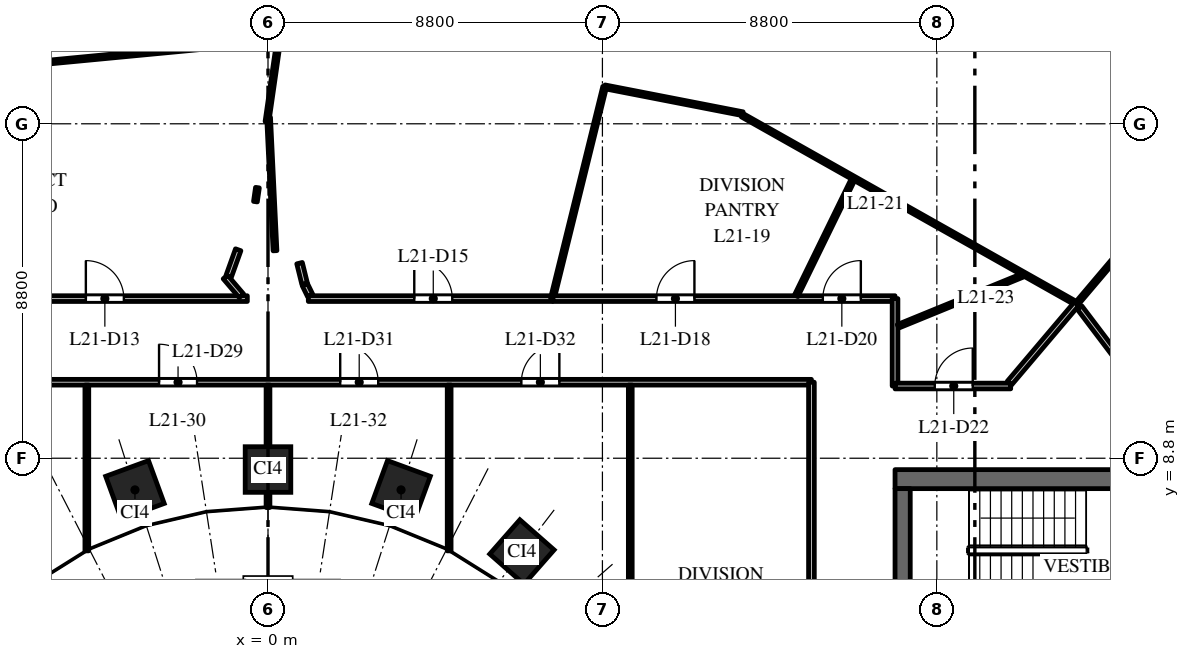
"""IFC4 building model, lengths in metres.
Left out: names, types, materials, properties, quantities, classifications, styles, units other than length and angle.
Written with IfcOpenShell. Run it as: python <this file> out.ifc"""

import sys

from ifc_helpers import new_model, si_unit, direction, frame, frame_2d, origin, origin_2d, place, context, subcontext, project, spatial, rectangle, extrude, element, fill, save


model = new_model("IFC4")
c1 = context("Model", 3, precision=1e-05, world=origin(), true_north=direction((0.0, 1.0)))
c2 = subcontext(c1, "Body", "Model", "MODEL_VIEW")
j1 = project(units=[si_unit("LENGTHUNIT", "METRE"), si_unit("PLANEANGLEUNIT", "RADIAN")], contexts=[c1])
p1 = place(None, origin())
s1 = spatial("IfcSite", under=j1, at=p1, CompositionType="ELEMENT")
p2 = place(p1, origin())
s2 = spatial("IfcBuilding", under=s1, at=p2, CompositionType="ELEMENT")
p3 = place(p2, frame((0.0, 0.0, 96.0)))
s3 = spatial("IfcBuildingStorey", under=s2, at=p3, CompositionType="ELEMENT", Elevation=96.0)
for number, where, z_axis, x_axis in (
    (1, (6.682, 6.334, 0.0), (0.0, 0.0, 1.0), (-0.751, 0.66, 0.0)),
    (2, (3.501, 7.967, 0.0), (0.0, 0.0, 1.0), (-0.939, 0.344, 0.0)),
    (3, (0.0, 8.503, 0.0), (0.0, 0.0, 1.0), (-1.0, 0.0, 0.0)),
    (4, (-3.501, 7.967, 0.0), (0.0, 0.0, 1.0), (-0.939, -0.344, 0.0)),
):
    element("IfcColumn", number, at=place(p3, frame(where, z_axis=z_axis, x_axis=x_axis)), inside=s3, PredefinedType="COLUMN", context=c2, shape_type="SweptSolid", body=[
        extrude(rectangle(XDim=1.2, YDim=1.2, at=origin_2d()), origin(), (0.0, 0.0, 1.0), 4.0),
    ])
p4 = place(p3, frame((16.5, 8.25, 0.0), z_axis=(0.0, 0.0, 1.0), x_axis=(1.0, 0.0, 0.0)))
e5 = element("IfcWall", 5, at=p4, inside=s3, PredefinedType="SHEAR", context=c2, shape_type="SweptSolid", body=[
    extrude(rectangle(XDim=15.0, YDim=0.5, at=frame_2d((7.5, 0.0))), origin(), (0.0, 0.0, 1.0), 3.7),
])
p5 = place(p4, frame((6.9, 0.0, 0.0)))
e6 = element("IfcOpeningElement", 6, at=p5, cuts=e5, PredefinedType="OPENING", context=c2, shape_type="SweptSolid", body=[
    extrude(rectangle(XDim=1.2, YDim=2.1, at=frame_2d((0.6, 1.05))), frame((0.0, 0.26, 0.0), z_axis=(0.0, -1.0, 0.0), x_axis=(1.0, 0.0, 0.0)), (0.0, 0.0, 1.0), 0.52),
])
p6 = place(p4, frame((12.05, 0.0, 0.0)))
e7 = element("IfcOpeningElement", 7, at=p6, cuts=e5, PredefinedType="OPENING", context=c2, shape_type="SweptSolid", body=[
    extrude(rectangle(XDim=0.9, YDim=2.1, at=frame_2d((0.45, 1.05))), frame((0.0, 0.26, 0.0), z_axis=(0.0, -1.0, 0.0), x_axis=(1.0, 0.0, 0.0)), (0.0, 0.0, 1.0), 0.52),
])
p7 = place(p3, frame((16.7, -8.0, 0.0), z_axis=(0.0, 0.0, 1.0), x_axis=(0.0, 1.0, 0.0)))
e8 = element("IfcWall", 8, at=p7, inside=s3, PredefinedType="SHEAR", context=c2, shape_type="SweptSolid", body=[
    extrude(rectangle(XDim=16.0, YDim=0.4, at=frame_2d((8.0, 0.0))), origin(), (0.0, 0.0, 1.0), 3.7),
])
p8 = place(p3, frame((-14.3, 10.8, 0.0), z_axis=(0.0, 0.0, 1.0), x_axis=(1.0, 0.0, 0.0)))
e9 = element("IfcWall", 9, at=p8, inside=s3, PredefinedType="PARTITIONING", context=c2, shape_type="SweptSolid", body=[
    extrude(rectangle(XDim=28.6, YDim=0.15, at=frame_2d((14.3, 0.0))), origin(), (0.0, 0.0, 1.0), 2.85),
])
p9 = place(p8, frame((11.433, 0.0, 0.0)))
e10 = element("IfcOpeningElement", 10, at=p9, cuts=e9, PredefinedType="OPENING", context=c2, shape_type="SweptSolid", body=[
    extrude(rectangle(XDim=1.0, YDim=2.1, at=frame_2d((0.5, 1.05))), frame((0.0, 0.085, 0.0), z_axis=(0.0, -1.0, 0.0), x_axis=(1.0, 0.0, 0.0)), (0.0, 0.0, 1.0), 0.17),
])
p10 = place(p8, frame((16.2, 0.0, 0.0)))
e11 = element("IfcOpeningElement", 11, at=p10, cuts=e9, PredefinedType="OPENING", context=c2, shape_type="SweptSolid", body=[
    extrude(rectangle(XDim=1.0, YDim=2.1, at=frame_2d((0.5, 1.05))), frame((0.0, 0.085, 0.0), z_axis=(0.0, -1.0, 0.0), x_axis=(1.0, 0.0, 0.0)), (0.0, 0.0, 1.0), 0.17),
])
p11 = place(p8, frame((20.967, 0.0, 0.0)))
e12 = element("IfcOpeningElement", 12, at=p11, cuts=e9, PredefinedType="OPENING", context=c2, shape_type="SweptSolid", body=[
    extrude(rectangle(XDim=1.0, YDim=2.1, at=frame_2d((0.5, 1.05))), frame((0.0, 0.085, 0.0), z_axis=(0.0, -1.0, 0.0), x_axis=(1.0, 0.0, 0.0)), (0.0, 0.0, 1.0), 0.17),
])
p12 = place(p3, frame((-8.802, 18.935, 0.0), z_axis=(0.0, 0.0, 1.0), x_axis=(0.995486812939, 0.094899975054, 0.0)))
e13 = element("IfcWall", 13, at=p12, inside=s3, PredefinedType="PARTITIONING", context=c2, shape_type="SweptSolid", body=[
    extrude(rectangle(XDim=8.24, YDim=0.1, at=frame_2d((4.12, 0.0))), origin(), (0.0, 0.0, 1.0), 2.85),
])
p13 = place(p3, frame((-7.767, 13.0, 0.0), z_axis=(0.0, 0.0, 1.0), x_axis=(1.0, 0.0, 0.0)))
e14 = element("IfcWall", 14, at=p13, inside=s3, PredefinedType="PARTITIONING", context=c2, shape_type="SweptSolid", body=[
    extrude(rectangle(XDim=7.223, YDim=0.15, at=frame_2d((3.612, 0.0))), origin(), (0.0, 0.0, 1.0), 2.85),
])
p14 = place(p13, frame((2.974, 0.0, 0.0)))
e15 = element("IfcOpeningElement", 15, at=p14, cuts=e14, PredefinedType="OPENING", context=c2, shape_type="SweptSolid", body=[
    extrude(rectangle(XDim=1.0, YDim=2.1, at=frame_2d((0.5, 1.05))), frame((0.0, 0.085, 0.0), z_axis=(0.0, -1.0, 0.0), x_axis=(1.0, 0.0, 0.0)), (0.0, 0.0, 1.0), 0.17),
])
p15 = place(p3, frame((-4.767, 6.363, 0.0), z_axis=(0.0, 0.0, 1.0), x_axis=(0.0, 1.0, 0.0)))
e16 = element("IfcWall", 16, at=p15, inside=s3, PredefinedType="PARTITIONING", context=c2, shape_type="SweptSolid", body=[
    extrude(rectangle(XDim=4.362, YDim=0.1, at=frame_2d((2.181, 0.0))), origin(), (0.0, 0.0, 1.0), 2.9),
])
p16 = place(p3, frame((-1.122, 13.57, 0.0), z_axis=(0.0, 0.0, 1.0), x_axis=(0.648780487805, -0.760975609756, 0.0)))
e17 = element("IfcWall", 17, at=p16, inside=s3, PredefinedType="PARTITIONING", context=c2, shape_type="SweptSolid", body=[
    extrude(rectangle(XDim=0.651, YDim=0.15, at=frame_2d((0.325, 0.0))), origin(), (0.0, 0.0, 1.0), 2.85),
])
p17 = place(p3, frame((-1.035, 13.586, 0.0), z_axis=(0.0, 0.0, 1.0), x_axis=(0.337939421495, 0.941167863561, 0.0)))
e18 = element("IfcWall", 18, at=p17, inside=s3, PredefinedType="PARTITIONING", context=c2, shape_type="SweptSolid", body=[
    extrude(rectangle(XDim=0.743, YDim=0.15, at=frame_2d((0.371, 0.0))), origin(), (0.0, 0.0, 1.0), 2.85),
])
p18 = place(p3, frame((-0.331, 15.551, 0.0), z_axis=(0.0, 0.0, 1.0), x_axis=(0.142155020728, 0.989844407006, 0.0)))
e19 = element("IfcWall", 19, at=p18, inside=s3, PredefinedType="PARTITIONING", context=c2, shape_type="SweptSolid", body=[
    extrude(rectangle(XDim=0.373, YDim=0.1, at=frame_2d((0.187, 0.0))), origin(), (0.0, 0.0, 1.0), 3.7),
])
p19 = place(p3, frame((-0.027, 17.654, 0.0), z_axis=(0.0, 0.0, 1.0), x_axis=(0.142950746257, 0.989729803605, 0.0)))
e20 = element("IfcWall", 20, at=p19, inside=s3, PredefinedType="PARTITIONING", context=c2, shape_type="SweptSolid", body=[
    extrude(rectangle(XDim=10.346, YDim=0.1, at=frame_2d((5.173, 0.0))), origin(), (0.0, 0.0, 1.0), 2.9),
])
p20 = place(p3, frame((0.0, 7.504, 0.0), z_axis=(0.0, 0.0, 1.0), x_axis=(0.0, 1.0, 0.0)))
e21 = element("IfcWall", 21, at=p20, inside=s3, PredefinedType="PARTITIONING", context=c2, shape_type="SweptSolid", body=[
    extrude(rectangle(XDim=3.221, YDim=0.1, at=frame_2d((1.611, 0.0))), origin(), (0.0, 0.0, 1.0), 3.7),
])
p21 = place(p3, frame((0.016, 17.767, 0.0), z_axis=(0.0, 0.0, 1.0), x_axis=(0.047839350467, -0.99885504281, 0.0)))
e22 = element("IfcWall", 22, at=p21, inside=s3, PredefinedType="PARTITIONING", context=c2, shape_type="SweptSolid", body=[
    extrude(rectangle(XDim=3.511, YDim=0.1, at=frame_2d((1.755, 0.0))), origin(), (0.0, 0.0, 1.0), 3.7),
])
p22 = place(p3, frame((0.83, 13.933, 0.0), z_axis=(0.0, 0.0, 1.0), x_axis=(0.239578315167, -0.970877042113, 0.0)))
e23 = element("IfcWall", 23, at=p22, inside=s3, PredefinedType="PARTITIONING", context=c2, shape_type="SweptSolid", body=[
    extrude(rectangle(XDim=0.563, YDim=0.15, at=frame_2d((0.282, 0.0))), origin(), (0.0, 0.0, 1.0), 3.7),
])
p23 = place(p3, frame((0.969, 13.369, 0.0), z_axis=(0.0, 0.0, 1.0), x_axis=(0.440240923942, -0.897879685084, 0.0)))
e24 = element("IfcWall", 24, at=p23, inside=s3, PredefinedType="PARTITIONING", context=c2, shape_type="SweptSolid", body=[
    extrude(rectangle(XDim=0.323, YDim=0.15, at=frame_2d((0.161, 0.0))), origin(), (0.0, 0.0, 1.0), 3.7),
])
p24 = place(p3, frame((1.061, 13.0, 0.0), z_axis=(0.0, 0.0, 1.0), x_axis=(1.0, 0.0, 0.0)))
e25 = element("IfcWall", 25, at=p24, inside=s3, PredefinedType="PARTITIONING", context=c2, shape_type="SweptSolid", body=[
    extrude(rectangle(XDim=6.422, YDim=0.15, at=frame_2d((3.211, 0.0))), origin(), (0.0, 0.0, 1.0), 2.85),
])
p25 = place(p24, frame((2.788, 0.0, 0.0)))
e26 = element("IfcOpeningElement", 26, at=p25, cuts=e25, PredefinedType="OPENING", context=c2, shape_type="SweptSolid", body=[
    extrude(rectangle(XDim=1.0, YDim=2.1, at=frame_2d((0.5, 1.05))), frame((0.0, 0.085, 0.0), z_axis=(0.0, -1.0, 0.0), x_axis=(1.0, 0.0, 0.0)), (0.0, 0.0, 1.0), 0.17),
])
p26 = place(p3, frame((4.767, 6.363, 0.0), z_axis=(0.0, 0.0, 1.0), x_axis=(0.0, 1.0, 0.0)))
e27 = element("IfcWall", 27, at=p26, inside=s3, PredefinedType="PARTITIONING", context=c2, shape_type="SweptSolid", body=[
    extrude(rectangle(XDim=4.362, YDim=0.1, at=frame_2d((2.181, 0.0))), origin(), (0.0, 0.0, 1.0), 2.85),
])
p27 = place(p3, frame((7.483, 13.0, 0.0), z_axis=(0.0, 0.0, 1.0), x_axis=(0.239702552944, 0.970846376165, 0.0)))
e28 = element("IfcWall", 28, at=p27, inside=s3, PredefinedType="PARTITIONING", context=c2, shape_type="SweptSolid", body=[
    extrude(rectangle(XDim=5.74, YDim=0.1, at=frame_2d((2.87, 0.0))), origin(), (0.0, 0.0, 1.0), 3.7),
])
p28 = place(p3, frame((7.499, 13.0, 0.0), z_axis=(0.0, 0.0, 1.0), x_axis=(1.0, 0.0, 0.0)))
e29 = element("IfcWall", 29, at=p28, inside=s3, PredefinedType="PARTITIONING", context=c2, shape_type="SweptSolid", body=[
    extrude(rectangle(XDim=9.001, YDim=0.15, at=frame_2d((4.5, 0.0))), origin(), (0.0, 0.0, 1.0), 2.85),
])
p29 = place(p28, frame((2.722, 0.0, 0.0)))
e30 = element("IfcOpeningElement", 30, at=p29, cuts=e29, PredefinedType="OPENING", context=c2, shape_type="SweptSolid", body=[
    extrude(rectangle(XDim=1.0, YDim=2.1, at=frame_2d((0.5, 1.05))), frame((0.0, 0.085, 0.0), z_axis=(0.0, -1.0, 0.0), x_axis=(1.0, 0.0, 0.0)), (0.0, 0.0, 1.0), 0.17),
])
p30 = place(p28, frame((7.101, 0.0, 0.0)))
e31 = element("IfcOpeningElement", 31, at=p30, cuts=e29, PredefinedType="OPENING", context=c2, shape_type="SweptSolid", body=[
    extrude(rectangle(XDim=1.0, YDim=2.1, at=frame_2d((0.5, 1.05))), frame((0.0, 0.085, 0.0), z_axis=(0.0, -1.0, 0.0), x_axis=(1.0, 0.0, 0.0)), (0.0, 0.0, 1.0), 0.17),
])
p31 = place(p3, frame((8.859, 18.573, 0.0), z_axis=(0.0, 0.0, 1.0), x_axis=(0.981554610727, -0.191181971328, 0.0)))
e32 = element("IfcWall", 32, at=p31, inside=s3, PredefinedType="PARTITIONING", context=c2, shape_type="SweptSolid", body=[
    extrude(rectangle(XDim=3.703, YDim=0.1, at=frame_2d((1.852, 0.0))), origin(), (0.0, 0.0, 1.0), 2.85),
])
p32 = place(p3, frame((9.533, -10.725, 0.0), z_axis=(0.0, 0.0, 1.0), x_axis=(0.0, 1.0, 0.0)))
e33 = element("IfcWall", 33, at=p32, inside=s3, PredefinedType="PARTITIONING", context=c2, shape_type="SweptSolid", body=[
    extrude(rectangle(XDim=21.45, YDim=0.1, at=frame_2d((10.725, 0.0))), origin(), (0.0, 0.0, 1.0), 2.75),
])
p33 = place(p3, frame((12.48, 17.825, 0.0), z_axis=(0.0, 0.0, 1.0), x_axis=(0.871131718637, -0.491049415827, 0.0)))
e34 = element("IfcWall", 34, at=p33, inside=s3, PredefinedType="PARTITIONING", context=c2, shape_type="SweptSolid", body=[
    extrude(rectangle(XDim=10.101, YDim=0.1, at=frame_2d((5.05, 0.0))), origin(), (0.0, 0.0, 1.0), 3.7),
])
p34 = place(p3, frame((13.899, 13.075, 0.0), z_axis=(0.0, 0.0, 1.0), x_axis=(0.439170148288, 0.898403907412, 0.0)))
e35 = element("IfcWall", 35, at=p34, inside=s3, PredefinedType="PARTITIONING", context=c2, shape_type="SweptSolid", body=[
    extrude(rectangle(XDim=3.395, YDim=0.1, at=frame_2d((1.698, 0.0))), origin(), (0.0, 0.0, 1.0), 3.7),
])
p35 = place(p3, frame((14.3, -10.8, 0.0), z_axis=(0.0, 0.0, 1.0), x_axis=(0.0, 1.0, 0.0)))
e36 = element("IfcWall", 36, at=p35, inside=s3, PredefinedType="PARTITIONING", context=c2, shape_type="SweptSolid", body=[
    extrude(rectangle(XDim=21.6, YDim=0.15, at=frame_2d((10.8, 0.0))), origin(), (0.0, 0.0, 1.0), 2.75),
])
p36 = place(p35, frame((10.2, 0.0, 0.0)))
e37 = element("IfcOpeningElement", 37, at=p36, cuts=e36, PredefinedType="OPENING", context=c2, shape_type="SweptSolid", body=[
    extrude(rectangle(XDim=1.0, YDim=2.1, at=frame_2d((0.5, 1.05))), frame((0.0, 0.085, 0.0), z_axis=(0.0, -1.0, 0.0), x_axis=(1.0, 0.0, 0.0)), (0.0, 0.0, 1.0), 0.17),
])
p37 = place(p3, frame((16.5, 10.7, 0.0), z_axis=(0.0, 0.0, 1.0), x_axis=(0.0, 1.0, 0.0)))
e38 = element("IfcWall", 38, at=p37, inside=s3, PredefinedType="PARTITIONING", context=c2, shape_type="SweptSolid", body=[
    extrude(rectangle(XDim=2.3, YDim=0.15, at=frame_2d((1.15, 0.0))), origin(), (0.0, 0.0, 1.0), 3.7),
])
p38 = place(p3, frame((16.5, 10.7, 0.0), z_axis=(0.0, 0.0, 1.0), x_axis=(1.0, 0.0, 0.0)))
e39 = element("IfcWall", 39, at=p38, inside=s3, PredefinedType="PARTITIONING", context=c2, shape_type="SweptSolid", body=[
    extrude(rectangle(XDim=3.043, YDim=0.15, at=frame_2d((1.521, 0.0))), origin(), (0.0, 0.0, 1.0), 3.7),
])
p39 = place(p38, frame((1.045, 0.0, 0.0)))
e40 = element("IfcOpeningElement", 40, at=p39, cuts=e39, PredefinedType="OPENING", context=c2, shape_type="SweptSolid", body=[
    extrude(rectangle(XDim=1.0, YDim=2.1, at=frame_2d((0.5, 1.05))), frame((0.0, 0.085, 0.0), z_axis=(0.0, -1.0, 0.0), x_axis=(1.0, 0.0, 0.0)), (0.0, 0.0, 1.0), 0.17),
])
p40 = place(p3, frame((16.579, 12.271, 0.0), z_axis=(0.0, 0.0, 1.0), x_axis=(0.925511782592, 0.378718814272, 0.0)))
e41 = element("IfcWall", 41, at=p40, inside=s3, PredefinedType="PARTITIONING", context=c2, shape_type="SweptSolid", body=[
    extrude(rectangle(XDim=3.539, YDim=0.1, at=frame_2d((1.769, 0.0))), origin(), (0.0, 0.0, 1.0), 3.7),
])
p41 = place(p3, frame((19.511, 10.778, 0.0), z_axis=(0.0, 0.0, 1.0), x_axis=(0.64641426768, 0.762986628021, 0.0)))
e42 = element("IfcWall", 42, at=p41, inside=s3, PredefinedType="PARTITIONING", context=c2, shape_type="SweptSolid", body=[
    extrude(rectangle(XDim=2.735, YDim=0.15, at=frame_2d((1.368, 0.0))), origin(), (0.0, 0.0, 1.0), 3.7),
])
p42 = place(p3, frame((21.355, 12.765, 0.0), z_axis=(0.0, 0.0, 1.0), x_axis=(0.603391001626, -0.797445483502, 0.0)))
e43 = element("IfcWall", 43, at=p42, inside=s3, PredefinedType="PARTITIONING", context=c2, shape_type="SweptSolid", body=[
    extrude(rectangle(XDim=2.68, YDim=0.15, at=frame_2d((1.34, 0.0))), origin(), (0.0, 0.0, 1.0), 2.75),
])
p43 = place(p3, frame((21.279, 12.865, 0.0), z_axis=(0.0, 0.0, 1.0), x_axis=(0.646395355102, 0.763002650652, 0.0)))
e44 = element("IfcWall", 44, at=p43, inside=s3, PredefinedType="PARTITIONING", context=c2, shape_type="SweptSolid", body=[
    extrude(rectangle(XDim=7.969, YDim=0.1, at=frame_2d((3.984, 0.0))), origin(), (0.0, 0.0, 1.0), 2.9),
])
p44 = place(p14, origin())
e45 = element("IfcDoor", 45, at=p44, inside=s3, OperationType="SINGLE_SWING_LEFT", PredefinedType="DOOR", context=c2, shape_type="SweptSolid", body=[
    extrude(rectangle(XDim=1.0, YDim=2.1, at=frame_2d((0.5, 1.05))), frame((0.0, 0.025, 0.0), z_axis=(0.0, -1.0, 0.0), x_axis=(1.0, 0.0, 0.0)), (0.0, 0.0, 1.0), 0.05),
])
fill(e15, e45)
p45 = place(p25, origin())
e46 = element("IfcDoor", 46, at=p45, inside=s3, OperationType="SINGLE_SWING_LEFT", PredefinedType="DOOR", context=c2, shape_type="SweptSolid", body=[
    extrude(rectangle(XDim=1.0, YDim=2.1, at=frame_2d((0.5, 1.05))), frame((0.0, 0.025, 0.0), z_axis=(0.0, -1.0, 0.0), x_axis=(1.0, 0.0, 0.0)), (0.0, 0.0, 1.0), 0.05),
])
fill(e26, e46)
p46 = place(p29, origin())
e47 = element("IfcDoor", 47, at=p46, inside=s3, OperationType="SINGLE_SWING_RIGHT", PredefinedType="DOOR", context=c2, shape_type="SweptSolid", body=[
    extrude(rectangle(XDim=1.0, YDim=2.1, at=frame_2d((0.5, 1.05))), frame((0.0, 0.025, 0.0), z_axis=(0.0, -1.0, 0.0), x_axis=(1.0, 0.0, 0.0)), (0.0, 0.0, 1.0), 0.05),
])
fill(e30, e47)
p47 = place(p30, origin())
e48 = element("IfcDoor", 48, at=p47, inside=s3, OperationType="SINGLE_SWING_RIGHT", PredefinedType="DOOR", context=c2, shape_type="SweptSolid", body=[
    extrude(rectangle(XDim=1.0, YDim=2.1, at=frame_2d((0.5, 1.05))), frame((0.0, 0.025, 0.0), z_axis=(0.0, -1.0, 0.0), x_axis=(1.0, 0.0, 0.0)), (0.0, 0.0, 1.0), 0.05),
])
fill(e31, e48)
p48 = place(p39, origin())
e49 = element("IfcDoor", 49, at=p48, inside=s3, OperationType="SINGLE_SWING_RIGHT", PredefinedType="DOOR", context=c2, shape_type="SweptSolid", body=[
    extrude(rectangle(XDim=1.0, YDim=2.1, at=frame_2d((0.5, 1.05))), frame((0.0, 0.025, 0.0), z_axis=(0.0, -1.0, 0.0), x_axis=(1.0, 0.0, 0.0)), (0.0, 0.0, 1.0), 0.05),
])
fill(e40, e49)
p49 = place(p9, origin())
e50 = element("IfcDoor", 50, at=p49, inside=s3, OperationType="SINGLE_SWING_LEFT", PredefinedType="DOOR", context=c2, shape_type="SweptSolid", body=[
    extrude(rectangle(XDim=1.0, YDim=2.1, at=frame_2d((0.5, 1.05))), frame((0.0, 0.025, 0.0), z_axis=(0.0, -1.0, 0.0), x_axis=(1.0, 0.0, 0.0)), (0.0, 0.0, 1.0), 0.05),
])
fill(e10, e50)
p50 = place(p10, origin())
e51 = element("IfcDoor", 51, at=p50, inside=s3, OperationType="SINGLE_SWING_LEFT", PredefinedType="DOOR", context=c2, shape_type="SweptSolid", body=[
    extrude(rectangle(XDim=1.0, YDim=2.1, at=frame_2d((0.5, 1.05))), frame((0.0, 0.025, 0.0), z_axis=(0.0, -1.0, 0.0), x_axis=(1.0, 0.0, 0.0)), (0.0, 0.0, 1.0), 0.05),
])
fill(e11, e51)
p51 = place(p11, origin())
e52 = element("IfcDoor", 52, at=p51, inside=s3, OperationType="SINGLE_SWING_RIGHT", PredefinedType="DOOR", context=c2, shape_type="SweptSolid", body=[
    extrude(rectangle(XDim=1.0, YDim=2.1, at=frame_2d((0.5, 1.05))), frame((0.0, 0.025, 0.0), z_axis=(0.0, -1.0, 0.0), x_axis=(1.0, 0.0, 0.0)), (0.0, 0.0, 1.0), 0.05),
])
fill(e12, e52)
save(model, sys.argv[1])
